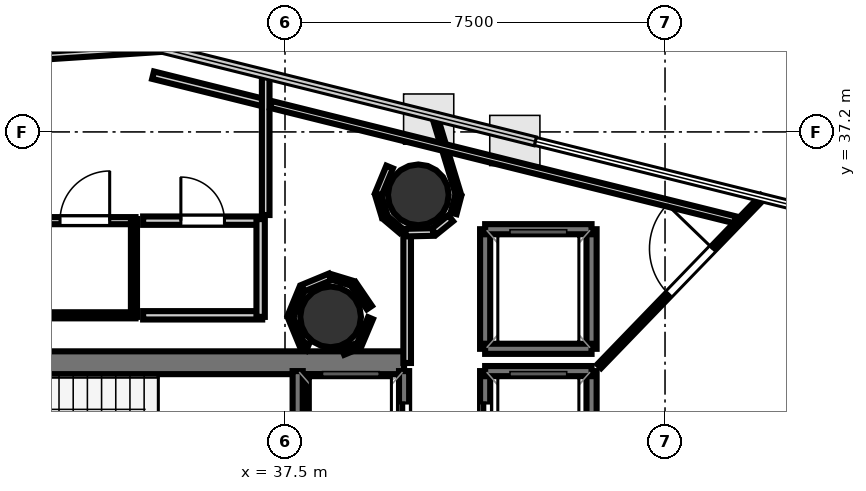
"""IFC4 building model, lengths in metres.
Left out: names, types, materials, properties, quantities, classifications, styles, units other than length and angle.
Written with IfcOpenShell. Run it as: python <this file> out.ifc"""

import sys

from ifc_helpers import new_model, si_unit, direction, frame, frame_2d, origin, origin_2d, place, context, subcontext, project, spatial, rectangle, hollow_circle, extrude, element, fill, save


model = new_model("IFC4")
c1 = context("Model", 3, precision=1e-05, world=origin(), true_north=direction((0.0, 1.0)))
c2 = subcontext(c1, "Body", "Model", "MODEL_VIEW")
j1 = project(units=[si_unit("LENGTHUNIT", "METRE"), si_unit("PLANEANGLEUNIT", "RADIAN")], contexts=[c1])
p1 = place(None, origin())
s1 = spatial("IfcSite", under=j1, at=p1, CompositionType="ELEMENT")
p2 = place(p1, origin())
s2 = spatial("IfcBuilding", under=s1, at=p2, CompositionType="ELEMENT")
p3 = place(p2, frame((0.0, 0.0, 192.9)))
s3 = spatial("IfcBuildingStorey", under=s2, at=p3, CompositionType="ELEMENT", Elevation=192.9)
p4 = place(p3, frame((29.33, 32.645, 0.0), z_axis=(0.0, 0.0, 1.0), x_axis=(1.0, 0.0, 0.0)))
e1 = element("IfcWall", 1, at=p4, inside=s3, PredefinedType="SHEAR", context=c2, shape_type="SweptSolid", body=[
    extrude(rectangle(XDim=10.52, YDim=0.45, at=frame_2d((5.26, 0.0))), origin(), (0.0, 0.0, 1.0), 3.52),
])
p5 = place(p4, frame((0.895, 0.0, 0.0)))
e2 = element("IfcOpeningElement", 2, at=p5, cuts=e1, PredefinedType="OPENING", context=c2, shape_type="SweptSolid", body=[
    extrude(rectangle(XDim=1.25, YDim=2.15, at=frame_2d((0.625, 1.075))), frame((0.0, 0.235, 0.0), z_axis=(0.0, -1.0, 0.0), x_axis=(1.0, 0.0, 0.0)), (0.0, 0.0, 1.0), 0.47),
])
p6 = place(p3, frame((38.18, 24.98, 0.0), z_axis=(0.0, 0.0, 1.0), x_axis=(0.0, 1.0, 0.0)))
e3 = element("IfcWall", 3, at=p6, inside=s3, PredefinedType="SHEAR", context=c2, shape_type="SweptSolid", body=[
    extrude(rectangle(XDim=7.44, YDim=0.45, at=frame_2d((3.72, 0.0))), origin(), (0.0, 0.0, 1.0), 3.52),
])
for number, where, z_axis, x_axis in (
    (4, (38.4, 33.55, 0.0), (0.0, 0.0, 1.0), (1.0, 0.0, 0.0)),
    (5, (40.131, 35.958, 0.0), (0.0, 0.0, 1.0), (1.0, 0.0, 0.0)),
):
    element("IfcColumn", number, at=place(p3, frame(where, z_axis=z_axis, x_axis=x_axis)), inside=s3, PredefinedType="COLUMN", context=c2, shape_type="SweptSolid", body=[
        extrude(hollow_circle(Radius=0.6, WallThickness=0.03, at=origin_2d()), origin(), (0.0, 0.0, 1.0), 3.7),
    ])
p7 = place(p3, frame((39.85, 30.12, 0.0), z_axis=(0.0, 0.0, 1.0), x_axis=(0.0, 1.0, 0.0)))
e6 = element("IfcWall", 6, at=p7, inside=s3, PredefinedType="SOLIDWALL", context=c2, shape_type="SweptSolid", body=[
    extrude(rectangle(XDim=2.36, YDim=0.2, at=frame_2d((1.18, 0.0))), origin(), (0.0, 0.0, 1.0), 3.52),
])
p8 = place(p7, frame((0.63, 0.0, 0.0)))
e7 = element("IfcOpeningElement", 7, at=p8, cuts=e6, PredefinedType="OPENING", context=c2, shape_type="SweptSolid", body=[
    extrude(rectangle(XDim=1.1, YDim=2.15, at=frame_2d((0.55, 1.075))), frame((0.0, 0.11, 0.0), z_axis=(0.0, -1.0, 0.0), x_axis=(1.0, 0.0, 0.0)), (0.0, 0.0, 1.0), 0.22),
])
for number, where, z_axis, x_axis in (
    (8, (37.75, 30.12, 0.0), (0.0, 0.0, 1.0), (0.0, 1.0, 0.0)),
    (9, (43.55, 30.12, 0.0), (0.0, 0.0, 1.0), (0.0, 1.0, 0.0)),
):
    element("IfcWall", number, at=place(p3, frame(where, z_axis=z_axis, x_axis=x_axis)), inside=s3, PredefinedType="SOLIDWALL", context=c2, shape_type="SweptSolid", body=[
        extrude(rectangle(XDim=2.36, YDim=0.2, at=frame_2d((1.18, 0.0))), origin(), (0.0, 0.0, 1.0), 3.52),
    ])
p9 = place(p3, frame((41.45, 30.12, 0.0), z_axis=(0.0, 0.0, 1.0), x_axis=(0.0, 1.0, 0.0)))
e10 = element("IfcWall", 10, at=p9, inside=s3, PredefinedType="SOLIDWALL", context=c2, shape_type="SweptSolid", body=[
    extrude(rectangle(XDim=2.36, YDim=0.2, at=frame_2d((1.18, 0.0))), origin(), (0.0, 0.0, 1.0), 3.52),
])
p10 = place(p9, frame((0.63, 0.0, 0.0)))
e11 = element("IfcOpeningElement", 11, at=p10, cuts=e10, PredefinedType="OPENING", context=c2, shape_type="SweptSolid", body=[
    extrude(rectangle(XDim=1.1, YDim=2.15, at=frame_2d((0.55, 1.075))), frame((0.0, 0.11, 0.0), z_axis=(0.0, -1.0, 0.0), x_axis=(1.0, 0.0, 0.0)), (0.0, 0.0, 1.0), 0.22),
])
p11 = place(p3, frame((41.45, 32.48, 0.0), z_axis=(0.0, 0.0, 1.0), x_axis=(1.0, 0.0, 0.0)))
e12 = element("IfcWall", 12, at=p11, inside=s3, PredefinedType="SOLIDWALL", context=c2, shape_type="SweptSolid", body=[
    extrude(rectangle(XDim=2.1, YDim=0.2, at=frame_2d((1.05, 0.0))), origin(), (0.0, 0.0, 1.0), 3.52),
])
for number, where, z_axis, x_axis in (
    (13, (43.55, 32.92, 0.0), (0.0, 0.0, 1.0), (0.0, 1.0, 0.0)),
    (14, (41.45, 32.92, 0.0), (0.0, 0.0, 1.0), (0.0, 1.0, 0.0)),
):
    element("IfcWall", number, at=place(p3, frame(where, z_axis=z_axis, x_axis=x_axis)), inside=s3, PredefinedType="SOLIDWALL", context=c2, shape_type="SweptSolid", body=[
        extrude(rectangle(XDim=2.36, YDim=0.2, at=frame_2d((1.18, 0.0))), origin(), (0.0, 0.0, 1.0), 3.52),
    ])
for number, where, z_axis, x_axis in (
    (15, (41.45, 35.28, 0.0), (0.0, 0.0, 1.0), (1.0, 0.0, 0.0)),
    (16, (41.45, 32.92, 0.0), (0.0, 0.0, 1.0), (1.0, 0.0, 0.0)),
):
    element("IfcWall", number, at=place(p3, frame(where, z_axis=z_axis, x_axis=x_axis)), inside=s3, PredefinedType="SOLIDWALL", context=c2, shape_type="SweptSolid", body=[
        extrude(rectangle(XDim=2.1, YDim=0.2, at=frame_2d((1.05, 0.0))), origin(), (0.0, 0.0, 1.0), 3.52),
    ])
p12 = place(p3, frame((39.911, 32.64, 0.0), z_axis=(0.0, 0.0, 1.0), x_axis=(0.0, 1.0, 0.0)))
e17 = element("IfcWall", 17, at=p12, inside=s3, PredefinedType="PARTITIONING", context=c2, shape_type="SweptSolid", body=[
    extrude(rectangle(XDim=2.604, YDim=0.15, at=frame_2d((1.302, 0.0))), origin(), (0.0, 0.0, 1.0), 2.84),
])
p13 = place(p3, frame((39.881, 35.213, 0.0), z_axis=(0.0, 0.0, 1.0), x_axis=(0.999756500784, 0.02206669754, 0.0)))
e18 = element("IfcWall", 18, at=p13, inside=s3, PredefinedType="PARTITIONING", context=c2, shape_type="SweptSolid", body=[
    extrude(rectangle(XDim=0.542, YDim=0.15, at=frame_2d((0.271, 0.0))), origin(), (0.0, 0.0, 1.0), 2.84),
])
p14 = place(p3, frame((40.441, 35.232, 0.0), z_axis=(0.0, 0.0, 1.0), x_axis=(0.778714564707, 0.627378376033, 0.0)))
e19 = element("IfcWall", 19, at=p14, inside=s3, PredefinedType="PARTITIONING", context=c2, shape_type="SweptSolid", body=[
    extrude(rectangle(XDim=0.421, YDim=0.15, at=frame_2d((0.21, 0.0))), origin(), (0.0, 0.0, 1.0), 2.84),
])
p15 = place(p3, frame((34.55, 33.581, 0.0), z_axis=(0.0, 0.0, 1.0), x_axis=(-1.0, 0.0, 0.0)))
e20 = element("IfcWall", 20, at=p15, inside=s3, PredefinedType="PARTITIONING", context=c2, shape_type="SweptSolid", body=[
    extrude(rectangle(XDim=2.0, YDim=0.12, at=frame_2d((1.0, 0.0))), origin(), (0.0, 0.0, 1.0), 2.84),
])
p16 = place(p3, frame((32.55, 35.449, 0.0), z_axis=(0.0, 0.0, 1.0), x_axis=(1.0, 0.0, 0.0)))
e21 = element("IfcWall", 21, at=p16, inside=s3, PredefinedType="PARTITIONING", context=c2, shape_type="SweptSolid", body=[
    extrude(rectangle(XDim=2.0, YDim=0.14, at=frame_2d((1.0, 0.0))), origin(), (0.0, 0.0, 1.0), 2.84),
])
p17 = place(p16, frame((0.51, 0.0, 0.0)))
e22 = element("IfcOpeningElement", 22, at=p17, cuts=e21, PredefinedType="OPENING", context=c2, shape_type="SweptSolid", body=[
    extrude(rectangle(XDim=0.98, YDim=2.1, at=frame_2d((0.49, 1.05))), frame((0.0, 0.08, 0.0), z_axis=(0.0, -1.0, 0.0), x_axis=(1.0, 0.0, 0.0)), (0.0, 0.0, 1.0), 0.16),
])
p18 = place(p3, frame((34.519, 35.48, 0.0), z_axis=(0.0, 0.0, 1.0), x_axis=(0.0, -1.0, 0.0)))
e23 = element("IfcWall", 23, at=p18, inside=s3, PredefinedType="PARTITIONING", context=c2, shape_type="SweptSolid", body=[
    extrude(rectangle(XDim=1.93, YDim=0.12, at=frame_2d((0.965, 0.0))), origin(), (0.0, 0.0, 1.0), 2.84),
])
p19 = place(p3, frame((37.05, 33.581, 0.0), z_axis=(0.0, 0.0, 1.0), x_axis=(-1.0, 0.0, 0.0)))
e24 = element("IfcWall", 24, at=p19, inside=s3, PredefinedType="PLUMBINGWALL", context=c2, shape_type="SweptSolid", body=[
    extrude(rectangle(XDim=2.35, YDim=0.165, at=frame_2d((1.175, 0.0))), origin(), (0.0, 0.0, 1.0), 2.84),
])
p20 = place(p3, frame((34.7, 35.449, 0.0), z_axis=(0.0, 0.0, 1.0), x_axis=(1.0, 0.0, 0.0)))
e25 = element("IfcWall", 25, at=p20, inside=s3, PredefinedType="PLUMBINGWALL", context=c2, shape_type="SweptSolid", body=[
    extrude(rectangle(XDim=2.35, YDim=0.165, at=frame_2d((1.175, 0.0))), origin(), (0.0, 0.0, 1.0), 2.84),
])
p21 = place(p20, frame((0.745, 0.0, 0.0)))
e26 = element("IfcOpeningElement", 26, at=p21, cuts=e25, PredefinedType="OPENING", context=c2, shape_type="SweptSolid", body=[
    extrude(rectangle(XDim=0.86, YDim=2.05, at=frame_2d((0.43, 1.025))), frame((0.0, 0.093, 0.0), z_axis=(0.0, -1.0, 0.0), x_axis=(1.0, 0.0, 0.0)), (0.0, 0.0, 1.0), 0.185),
])
p22 = place(p3, frame((37.019, 35.48, 0.0), z_axis=(0.0, 0.0, 1.0), x_axis=(0.0, -1.0, 0.0)))
e27 = element("IfcWall", 27, at=p22, inside=s3, PredefinedType="PLUMBINGWALL", context=c2, shape_type="SweptSolid", body=[
    extrude(rectangle(XDim=1.93, YDim=0.165, at=frame_2d((0.965, 0.0))), origin(), (0.0, 0.0, 1.0), 2.84),
])
p23 = place(p3, frame((26.872, 38.319, 0.0), z_axis=(0.0, 0.0, 1.0), x_axis=(0.99787015213, 0.065231583509, 0.0)))
e28 = element("IfcWall", 28, at=p23, inside=s3, PredefinedType="PARTITIONING", context=c2, shape_type="SweptSolid", body=[
    extrude(rectangle(XDim=8.181, YDim=0.15, at=frame_2d((4.091, 0.0))), origin(), (0.0, 0.0, 1.0), 2.84),
])
p24 = place(p3, frame((34.896, 38.32, 0.0), z_axis=(0.0, 0.0, 1.0), x_axis=(0.970501258802, -0.241096052774, 0.0)))
e29 = element("IfcWall", 29, at=p24, inside=s3, PredefinedType="PARTITIONING", context=c2, shape_type="SweptSolid", body=[
    extrude(rectangle(XDim=2.315, YDim=0.15, at=frame_2d((1.157, 0.0))), origin(), (0.0, 0.0, 1.0), 2.84),
])
p25 = place(p3, frame((37.119, 38.355, 0.0), z_axis=(0.0, 0.0, 1.0), x_axis=(0.0, -1.0, 0.0)))
e30 = element("IfcWall", 30, at=p25, inside=s3, PredefinedType="PARTITIONING", context=c2, shape_type="SweptSolid", body=[
    extrude(rectangle(XDim=2.795, YDim=0.15, at=frame_2d((1.397, 0.0))), origin(), (0.0, 0.0, 1.0), 2.84),
])
p26 = place(p3, frame((43.702, 32.576, 0.0), z_axis=(0.0, 0.0, 1.0), x_axis=(0.694641433789, 0.719356155506, 0.0)))
e31 = element("IfcWall", 31, at=p26, inside=s3, PredefinedType="PARTITIONING", context=c2, shape_type="SweptSolid", body=[
    extrude(rectangle(XDim=4.643, YDim=0.105, at=frame_2d((2.321, 0.0))), origin(), (0.0, 0.0, 1.0), 2.84),
])
p27 = place(p26, frame((1.976, 0.0, 0.0)))
e32 = element("IfcOpeningElement", 32, at=p27, cuts=e31, PredefinedType="OPENING", context=c2, shape_type="SweptSolid", body=[
    extrude(rectangle(XDim=1.25, YDim=2.2, at=frame_2d((0.625, 1.1))), frame((0.0, 0.062, 0.0), z_axis=(0.0, -1.0, 0.0), x_axis=(1.0, 0.0, 0.0)), (0.0, 0.0, 1.0), 0.125),
])
p28 = place(p3, frame((40.827, 35.592, 0.0), z_axis=(0.0, 0.0, 1.0), x_axis=(0.253227150491, 0.96740684836, 0.0)))
e33 = element("IfcWall", 33, at=p28, inside=s3, PredefinedType="PARTITIONING", context=c2, shape_type="SweptSolid", body=[
    extrude(rectangle(XDim=0.37, YDim=0.12, at=frame_2d((0.185, 0.0))), origin(), (0.0, 0.0, 1.0), 2.84),
])
p29 = place(p3, frame((40.921, 35.967, 0.0), z_axis=(0.0, 0.0, 1.0), x_axis=(-0.290302714428, 0.95693486403, 0.0)))
e34 = element("IfcWall", 34, at=p29, inside=s3, PredefinedType="PARTITIONING", context=c2, shape_type="SweptSolid", body=[
    extrude(rectangle(XDim=1.629, YDim=0.105, at=frame_2d((0.814, 0.0))), origin(), (0.0, 0.0, 1.0), 2.84),
])
p30 = place(p3, frame((39.565, 36.507, 0.0), z_axis=(0.0, 0.0, 1.0), x_axis=(-0.382796622927, -0.923832639322, 0.0)))
e35 = element("IfcWall", 35, at=p30, inside=s3, PredefinedType="PARTITIONING", context=c2, shape_type="SweptSolid", body=[
    extrude(rectangle(XDim=0.582, YDim=0.14, at=frame_2d((0.291, 0.0))), origin(), (0.0, 0.0, 1.0), 2.84),
])
p31 = place(p3, frame((39.341, 35.949, 0.0), z_axis=(0.0, 0.0, 1.0), x_axis=(0.290544943199, -0.956861346268, 0.0)))
e36 = element("IfcWall", 36, at=p31, inside=s3, PredefinedType="PARTITIONING", context=c2, shape_type="SweptSolid", body=[
    extrude(rectangle(XDim=0.441, YDim=0.12, at=frame_2d((0.221, 0.0))), origin(), (0.0, 0.0, 1.0), 2.84),
])
p32 = place(p3, frame((39.479, 35.512, 0.0), z_axis=(0.0, 0.0, 1.0), x_axis=(0.763588477055, -0.645703211784, 0.0)))
e37 = element("IfcWall", 37, at=p32, inside=s3, PredefinedType="PARTITIONING", context=c2, shape_type="SweptSolid", body=[
    extrude(rectangle(XDim=0.412, YDim=0.105, at=frame_2d((0.206, 0.0))), origin(), (0.0, 0.0, 1.0), 2.84),
])
p33 = place(p3, frame((39.166, 33.733, 0.0), z_axis=(0.0, 0.0, 1.0), x_axis=(-0.563162199293, 0.826346378517, 0.0)))
e38 = element("IfcWall", 38, at=p33, inside=s3, PredefinedType="PARTITIONING", context=c2, shape_type="SweptSolid", body=[
    extrude(rectangle(XDim=0.564, YDim=0.12, at=frame_2d((0.282, 0.0))), origin(), (0.0, 0.0, 1.0), 2.84),
])
p34 = place(p3, frame((38.831, 34.212, 0.0), z_axis=(0.0, 0.0, 1.0), x_axis=(-0.957061618741, 0.289884559665, 0.0)))
e39 = element("IfcWall", 39, at=p34, inside=s3, PredefinedType="PARTITIONING", context=c2, shape_type="SweptSolid", body=[
    extrude(rectangle(XDim=0.441, YDim=0.105, at=frame_2d((0.221, 0.0))), origin(), (0.0, 0.0, 1.0), 2.84),
])
p35 = place(p3, frame((38.388, 34.339, 0.0), z_axis=(0.0, 0.0, 1.0), x_axis=(-0.923894108428, -0.382648241093, 0.0)))
e40 = element("IfcWall", 40, at=p35, inside=s3, PredefinedType="PARTITIONING", context=c2, shape_type="SweptSolid", body=[
    extrude(rectangle(XDim=0.582, YDim=0.14, at=frame_2d((0.291, 0.0))), origin(), (0.0, 0.0, 1.0), 2.84),
])
p36 = place(p3, frame((37.834, 34.099, 0.0), z_axis=(0.0, 0.0, 1.0), x_axis=(-0.382796622927, -0.923832639322, 0.0)))
e41 = element("IfcWall", 41, at=p36, inside=s3, PredefinedType="PARTITIONING", context=c2, shape_type="SweptSolid", body=[
    extrude(rectangle(XDim=0.582, YDim=0.12, at=frame_2d((0.291, 0.0))), origin(), (0.0, 0.0, 1.0), 2.84),
])
p37 = place(p3, frame((37.611, 33.538, 0.0), z_axis=(0.0, 0.0, 1.0), x_axis=(0.382796622927, -0.923832639322, 0.0)))
e42 = element("IfcWall", 42, at=p37, inside=s3, PredefinedType="PARTITIONING", context=c2, shape_type="SweptSolid", body=[
    extrude(rectangle(XDim=0.582, YDim=0.105, at=frame_2d((0.291, 0.0))), origin(), (0.0, 0.0, 1.0), 2.84),
])
p38 = place(p3, frame((37.851, 32.984, 0.0), z_axis=(0.0, 0.0, 1.0), x_axis=(0.924628481531, -0.380870281252, 0.0)))
e43 = element("IfcWall", 43, at=p38, inside=s3, PredefinedType="PARTITIONING", context=c2, shape_type="SweptSolid", body=[
    extrude(rectangle(XDim=0.102, YDim=0.14, at=frame_2d((0.051, 0.0))), origin(), (0.0, 0.0, 1.0), 2.84),
])
p39 = place(p3, frame((38.645, 32.858, 0.0), z_axis=(0.0, 0.0, 1.0), x_axis=(0.923908393326, 0.382613748761, 0.0)))
e44 = element("IfcWall", 44, at=p39, inside=s3, PredefinedType="PARTITIONING", context=c2, shape_type="SweptSolid", body=[
    extrude(rectangle(XDim=0.329, YDim=0.12, at=frame_2d((0.165, 0.0))), origin(), (0.0, 0.0, 1.0), 2.84),
])
p40 = place(p3, frame((38.966, 33.0, 0.0), z_axis=(0.0, 0.0, 1.0), x_axis=(0.389247517771, 0.921133198788, 0.0)))
e45 = element("IfcWall", 45, at=p40, inside=s3, PredefinedType="PARTITIONING", context=c2, shape_type="SweptSolid", body=[
    extrude(rectangle(XDim=0.568, YDim=0.105, at=frame_2d((0.284, 0.0))), origin(), (0.0, 0.0, 1.0), 2.84),
])
p41 = place(p3, frame((37.222, 37.742, 0.0), z_axis=(0.0, 0.0, 1.0), x_axis=(0.97049288978, -0.241129738703, 0.0)))
e46 = element("IfcWall", 46, at=p41, inside=s3, PredefinedType="PARTITIONING", context=c2, shape_type="SweptSolid", body=[
    extrude(rectangle(XDim=9.44, YDim=0.14, at=frame_2d((4.72, 0.0))), origin(), (0.0, 0.0, 1.0), 2.84),
])
p42 = place(p8, origin())
e47 = element("IfcDoor", 47, at=p42, inside=s3, OperationType="SLIDING_TO_LEFT", PredefinedType="DOOR", context=c2, shape_type="SweptSolid", body=[
    extrude(rectangle(XDim=1.1, YDim=2.15, at=frame_2d((0.55, 1.075))), frame((0.0, 0.025, 0.0), z_axis=(0.0, -1.0, 0.0), x_axis=(1.0, 0.0, 0.0)), (0.0, 0.0, 1.0), 0.05),
])
fill(e7, e47)
p43 = place(p10, origin())
e48 = element("IfcDoor", 48, at=p43, inside=s3, OperationType="SLIDING_TO_LEFT", PredefinedType="DOOR", context=c2, shape_type="SweptSolid", body=[
    extrude(rectangle(XDim=1.1, YDim=2.15, at=frame_2d((0.55, 1.075))), frame((0.0, 0.025, 0.0), z_axis=(0.0, -1.0, 0.0), x_axis=(1.0, 0.0, 0.0)), (0.0, 0.0, 1.0), 0.05),
])
fill(e11, e48)
p44 = place(p17, origin())
e49 = element("IfcDoor", 49, at=p44, inside=s3, OperationType="SINGLE_SWING_RIGHT", PredefinedType="DOOR", context=c2, shape_type="SweptSolid", body=[
    extrude(rectangle(XDim=0.98, YDim=2.1, at=frame_2d((0.49, 1.05))), frame((0.0, 0.025, 0.0), z_axis=(0.0, -1.0, 0.0), x_axis=(1.0, 0.0, 0.0)), (0.0, 0.0, 1.0), 0.05),
])
fill(e22, e49)
p45 = place(p21, origin())
e50 = element("IfcDoor", 50, at=p45, inside=s3, OperationType="SINGLE_SWING_LEFT", PredefinedType="DOOR", context=c2, shape_type="SweptSolid", body=[
    extrude(rectangle(XDim=0.86, YDim=2.05, at=frame_2d((0.43, 1.025))), frame((0.0, 0.025, 0.0), z_axis=(0.0, -1.0, 0.0), x_axis=(1.0, 0.0, 0.0)), (0.0, 0.0, 1.0), 0.05),
])
fill(e26, e50)
p46 = place(p27, origin())
e51 = element("IfcDoor", 51, at=p46, inside=s3, OperationType="SINGLE_SWING_RIGHT", PredefinedType="DOOR", context=c2, shape_type="SweptSolid", body=[
    extrude(rectangle(XDim=1.25, YDim=2.2, at=frame_2d((0.625, 1.1))), frame((0.0, 0.025, 0.0), z_axis=(0.0, -1.0, 0.0), x_axis=(1.0, 0.0, 0.0)), (0.0, 0.0, 1.0), 0.05),
])
fill(e32, e51)
save(model, sys.argv[1])
